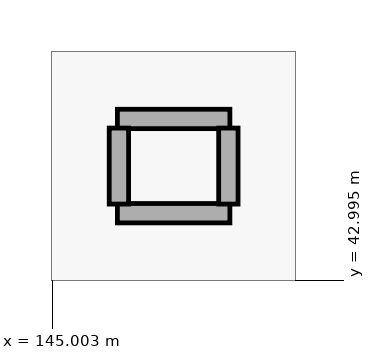
"""IFC4 building model, lengths in metres.
Left out: names, types, materials, properties, quantities, classifications, styles, units other than length and angle.
Written with IfcOpenShell. Run it as: python <this file> out.ifc"""

import sys

from ifc_helpers import new_model, si_unit, direction, frame, frame_2d, origin, place, context, subcontext, project, spatial, rectangle, extrude, element, save


model = new_model("IFC4")
c1 = context("Model", 3, precision=1e-05, world=origin(), true_north=direction((0.0, 1.0)))
c2 = subcontext(c1, "Body", "Model", "MODEL_VIEW")
j1 = project(units=[si_unit("LENGTHUNIT", "METRE"), si_unit("PLANEANGLEUNIT", "RADIAN")], contexts=[c1])
p1 = place(None, origin())
s1 = spatial("IfcSite", under=j1, at=p1, CompositionType="ELEMENT")
p2 = place(p1, origin())
s2 = spatial("IfcBuilding", under=s1, at=p2, CompositionType="ELEMENT")
p3 = place(p2, frame((0.0, 0.0, 26.4)))
s3 = spatial("IfcBuildingStorey", under=s2, at=p3, CompositionType="ELEMENT", Elevation=26.4)
for number, where, z_axis, x_axis in (
    (1, (145.86, 45.12, 0.0), (0.0, 0.0, 1.0), (1.0, 0.0, 0.0)),
    (2, (145.86, 43.88, 0.0), (0.0, 0.0, 1.0), (1.0, 0.0, 0.0)),
):
    element("IfcWall", number, at=place(p3, frame(where, z_axis=z_axis, x_axis=x_axis)), inside=s3, PredefinedType="PARTITIONING", context=c2, shape_type="SweptSolid", body=[
        extrude(rectangle(XDim=1.48, YDim=0.255, at=frame_2d((0.74, 0.0))), origin(), (0.0, 0.0, 1.0), 3.91),
    ])
p4 = place(p3, frame((145.88, 44.0, 0.0), z_axis=(0.0, 0.0, 1.0), x_axis=(0.0, 1.0, 0.0)))
e3 = element("IfcWall", 3, at=p4, inside=s3, PredefinedType="PARTITIONING", context=c2, shape_type="SweptSolid", body=[
    extrude(rectangle(XDim=1.0, YDim=0.255, at=frame_2d((0.5, 0.0))), origin(), (0.0, 0.0, 1.0), 4.2),
])
p5 = place(p3, frame((147.32, 44.0, 0.0), z_axis=(0.0, 0.0, 1.0), x_axis=(0.0, 1.0, 0.0)))
e4 = element("IfcWall", 4, at=p5, inside=s3, PredefinedType="PARTITIONING", context=c2, shape_type="SweptSolid", body=[
    extrude(rectangle(XDim=1.0, YDim=0.255, at=frame_2d((0.5, 0.0))), origin(), (0.0, 0.0, 1.0), 3.91),
])
save(model, sys.argv[1])
